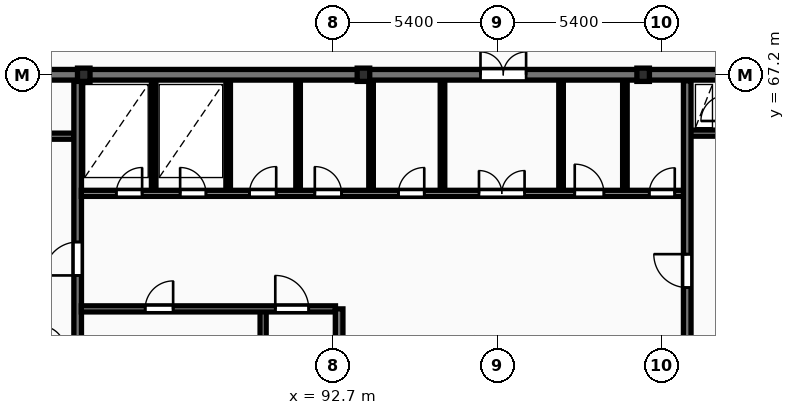
"""IFC4 building model, lengths in metres.
Left out: names, types, materials, properties, quantities, classifications, styles, units other than length and angle.
Written with IfcOpenShell. Run it as: python <this file> out.ifc"""

import sys

from ifc_helpers import new_model, si_unit, direction, frame, frame_2d, origin, origin_2d, place, context, subcontext, project, spatial, rectangle, i_section, extrude, element, fill, save


model = new_model("IFC4")
c1 = context("Model", 3, precision=1e-05, world=origin(), true_north=direction((0.0, 1.0)))
c2 = subcontext(c1, "Body", "Model", "MODEL_VIEW")
j1 = project(units=[si_unit("LENGTHUNIT", "METRE"), si_unit("PLANEANGLEUNIT", "RADIAN")], contexts=[c1])
p1 = place(None, origin())
s1 = spatial("IfcSite", under=j1, at=p1, CompositionType="ELEMENT")
p2 = place(p1, origin())
s2 = spatial("IfcBuilding", under=s1, at=p2, CompositionType="ELEMENT")
p3 = place(p2, frame((0.0, 0.0, 139.3)))
s3 = spatial("IfcBuildingStorey", under=s2, at=p3, CompositionType="ELEMENT", Elevation=139.3)
for number, where, z_axis, x_axis in (
    (1, (84.5, 67.2, 0.0), (0.0, 0.0, 1.0), (1.0, 0.0, 0.0)),
    (2, (93.7, 67.2, 0.0), (0.0, 0.0, 1.0), (1.0, 0.0, 0.0)),
    (3, (102.9, 67.2, 0.0), (0.0, 0.0, 1.0), (1.0, 0.0, 0.0)),
):
    element("IfcColumn", number, at=place(p3, frame(where, z_axis=z_axis, x_axis=x_axis)), inside=s3, PredefinedType="COLUMN", context=c2, shape_type="SweptSolid", body=[
        extrude(i_section(OverallWidth=0.412, OverallDepth=0.437, WebThickness=0.036, FlangeThickness=0.052, FilletRadius=0.015, at=origin_2d()), origin(), (0.0, 0.0, 1.0), 3.6),
    ])
p4 = place(p3, frame((75.95, 67.2, 0.0), z_axis=(0.0, 0.0, 1.0), x_axis=(1.0, 0.0, 0.0)))
e4 = element("IfcWall", 4, at=p4, inside=s3, PredefinedType="SHEAR", context=c2, shape_type="SweptSolid", body=[
    extrude(rectangle(XDim=36.3, YDim=0.35, at=frame_2d((18.15, 0.0))), origin(), (0.0, 0.0, 1.0), 3.6),
])
p5 = place(p4, frame((5.25, 0.0, 0.0)))
e5 = element("IfcOpeningElement", 5, at=p5, cuts=e4, PredefinedType="OPENING", context=c2, shape_type="SweptSolid", body=[
    extrude(rectangle(XDim=1.0, YDim=2.15, at=frame_2d((0.5, 1.075))), frame((0.0, 0.185, 0.0), z_axis=(0.0, -1.0, 0.0), x_axis=(1.0, 0.0, 0.0)), (0.0, 0.0, 1.0), 0.37),
])
p6 = place(p4, frame((21.6, 0.0, 0.0)))
e6 = element("IfcOpeningElement", 6, at=p6, cuts=e4, PredefinedType="OPENING", context=c2, shape_type="SweptSolid", body=[
    extrude(rectangle(XDim=1.5, YDim=2.2, at=frame_2d((0.75, 1.1))), frame((0.0, 0.185, 0.0), z_axis=(0.0, -1.0, 0.0), x_axis=(1.0, 0.0, 0.0)), (0.0, 0.0, 1.0), 0.37),
])
p7 = place(p4, frame((30.45, 0.0, 0.0)))
e7 = element("IfcOpeningElement", 7, at=p7, cuts=e4, PredefinedType="OPENING", context=c2, shape_type="SweptSolid", body=[
    extrude(rectangle(XDim=1.0, YDim=2.15, at=frame_2d((0.5, 1.075))), frame((0.0, 0.185, 0.0), z_axis=(0.0, -1.0, 0.0), x_axis=(1.0, 0.0, 0.0)), (0.0, 0.0, 1.0), 0.37),
])
p8 = place(p3, frame((79.79, 65.18, 0.0), z_axis=(0.0, 0.0, 1.0), x_axis=(1.0, 0.0, 0.0)))
e8 = element("IfcWall", 8, at=p8, inside=s3, PredefinedType="PARTITIONING", context=c2, shape_type="SweptSolid", body=[
    extrude(rectangle(XDim=4.39, YDim=0.2, at=frame_2d((2.195, 0.0))), origin(), (0.0, 0.0, 1.0), 3.31),
])
p9 = place(p8, frame((1.5, 0.0, 0.0)))
e9 = element("IfcOpeningElement", 9, at=p9, cuts=e8, PredefinedType="OPENING", context=c2, shape_type="SweptSolid", body=[
    extrude(rectangle(XDim=1.1, YDim=2.1, at=frame_2d((0.55, 1.05))), frame((0.0, 0.11, 0.0), z_axis=(0.0, -1.0, 0.0), x_axis=(1.0, 0.0, 0.0)), (0.0, 0.0, 1.0), 0.22),
])
p10 = place(p3, frame((84.3, 55.4, 0.0), z_axis=(0.0, 0.0, 1.0), x_axis=(0.0, 1.0, 0.0)))
e10 = element("IfcWall", 10, at=p10, inside=s3, PredefinedType="SHEAR", context=c2, shape_type="SweptSolid", body=[
    extrude(rectangle(XDim=11.6, YDim=0.25, at=frame_2d((5.8, 0.0))), origin(), (0.0, 0.0, 1.0), 3.6),
])
p11 = place(p10, frame((5.2, 0.0, 0.0)))
e11 = element("IfcOpeningElement", 11, at=p11, cuts=e10, PredefinedType="OPENING", context=c2, shape_type="SweptSolid", body=[
    extrude(rectangle(XDim=1.1, YDim=2.1, at=frame_2d((0.55, 1.05))), frame((0.0, 0.135, 0.0), z_axis=(0.0, -1.0, 0.0), x_axis=(1.0, 0.0, 0.0)), (0.0, 0.0, 1.0), 0.27),
])
p12 = place(p3, frame((90.4, 55.4, 0.0), z_axis=(0.0, 0.0, 1.0), x_axis=(0.0, 1.0, 0.0)))
e12 = element("IfcWall", 12, at=p12, inside=s3, PredefinedType="PARTITIONING", context=c2, shape_type="SweptSolid", body=[
    extrude(rectangle(XDim=4.1, YDim=0.2, at=frame_2d((2.05, 0.0))), origin(), (0.0, 0.0, 1.0), 3.31),
])
p13 = place(p3, frame((84.42, 59.5, 0.0), z_axis=(0.0, 0.0, 1.0), x_axis=(1.0, 0.0, 0.0)))
e13 = element("IfcWall", 13, at=p13, inside=s3, PredefinedType="PARTITIONING", context=c2, shape_type="SweptSolid", body=[
    extrude(rectangle(XDim=8.36, YDim=0.2, at=frame_2d((4.18, 0.0))), origin(), (0.0, 0.0, 1.0), 3.31),
])
p14 = place(p13, frame((2.1, 0.0, 0.0)))
e14 = element("IfcOpeningElement", 14, at=p14, cuts=e13, PredefinedType="OPENING", context=c2, shape_type="SweptSolid", body=[
    extrude(rectangle(XDim=0.92, YDim=2.08, at=frame_2d((0.46, 1.04))), frame((0.0, 0.11, 0.0), z_axis=(0.0, -1.0, 0.0), x_axis=(1.0, 0.0, 0.0)), (0.0, 0.0, 1.0), 0.22),
])
p15 = place(p13, frame((6.38, 0.0, 0.0)))
e15 = element("IfcOpeningElement", 15, at=p15, cuts=e13, PredefinedType="OPENING", context=c2, shape_type="SweptSolid", body=[
    extrude(rectangle(XDim=1.1, YDim=2.1, at=frame_2d((0.55, 1.05))), frame((0.0, 0.11, 0.0), z_axis=(0.0, -1.0, 0.0), x_axis=(1.0, 0.0, 0.0)), (0.0, 0.0, 1.0), 0.22),
])
p16 = place(p3, frame((92.9, 55.4, 0.0), z_axis=(0.0, 0.0, 1.0), x_axis=(0.0, 1.0, 0.0)))
e16 = element("IfcWall", 16, at=p16, inside=s3, PredefinedType="SHEAR", context=c2, shape_type="SweptSolid", body=[
    extrude(rectangle(XDim=4.1, YDim=0.25, at=frame_2d((2.05, 0.0))), origin(), (0.0, 0.0, 1.0), 3.6),
])
for number, where, z_axis, x_axis in (
    (17, (86.8, 63.4, 0.0), (0.0, 0.0, 1.0), (0.0, 1.0, 0.0)),
    (18, (89.25, 63.4, 0.0), (0.0, 0.0, 1.0), (0.0, 1.0, 0.0)),
    (19, (91.55, 63.4, 0.0), (0.0, 0.0, 1.0), (0.0, 1.0, 0.0)),
):
    element("IfcWall", number, at=place(p3, frame(where, z_axis=z_axis, x_axis=x_axis)), inside=s3, PredefinedType="PARTITIONING", context=c2, shape_type="SweptSolid", body=[
        extrude(rectangle(XDim=3.6, YDim=0.15, at=frame_2d((1.8, 0.0))), origin(), (0.0, 0.0, 1.0), 3.31),
    ])
p17 = place(p3, frame((93.95, 63.4, 0.0), z_axis=(0.0, 0.0, 1.0), x_axis=(0.0, 1.0, 0.0)))
e20 = element("IfcWall", 20, at=p17, inside=s3, PredefinedType="PARTITIONING", context=c2, shape_type="SweptSolid", body=[
    extrude(rectangle(XDim=3.6, YDim=0.15, at=frame_2d((1.8, 0.0))), origin(), (0.0, 0.0, 1.0), 2.617),
])
for number, where, z_axis, x_axis in (
    (21, (102.3, 63.4, 0.0), (0.0, 0.0, 1.0), (0.0, 1.0, 0.0)),
    (22, (96.3, 63.4, 0.0), (0.0, 0.0, 1.0), (0.0, 1.0, 0.0)),
    (23, (100.2, 63.4, 0.0), (0.0, 0.0, 1.0), (0.0, 1.0, 0.0)),
):
    element("IfcWall", number, at=place(p3, frame(where, z_axis=z_axis, x_axis=x_axis)), inside=s3, PredefinedType="PARTITIONING", context=c2, shape_type="SweptSolid", body=[
        extrude(rectangle(XDim=3.6, YDim=0.15, at=frame_2d((1.8, 0.0))), origin(), (0.0, 0.0, 1.0), 3.31),
    ])
p18 = place(p3, frame((84.42, 63.3, 0.0), z_axis=(0.0, 0.0, 1.0), x_axis=(1.0, 0.0, 0.0)))
e24 = element("IfcWall", 24, at=p18, inside=s3, PredefinedType="PARTITIONING", context=c2, shape_type="SweptSolid", body=[
    extrude(rectangle(XDim=19.83, YDim=0.2, at=frame_2d((9.915, 0.0))), origin(), (0.0, 0.0, 1.0), 3.31),
])
p19 = place(p18, frame((1.15, 0.0, 0.0)))
e25 = element("IfcOpeningElement", 25, at=p19, cuts=e24, PredefinedType="OPENING", context=c2, shape_type="SweptSolid", body=[
    extrude(rectangle(XDim=0.85, YDim=2.05, at=frame_2d((0.425, 1.025))), frame((0.0, 0.11, 0.0), z_axis=(0.0, -1.0, 0.0), x_axis=(1.0, 0.0, 0.0)), (0.0, 0.0, 1.0), 0.22),
])
p20 = place(p18, frame((3.25, 0.0, 0.0)))
e26 = element("IfcOpeningElement", 26, at=p20, cuts=e24, PredefinedType="OPENING", context=c2, shape_type="SweptSolid", body=[
    extrude(rectangle(XDim=0.85, YDim=2.05, at=frame_2d((0.425, 1.025))), frame((0.0, 0.11, 0.0), z_axis=(0.0, -1.0, 0.0), x_axis=(1.0, 0.0, 0.0)), (0.0, 0.0, 1.0), 0.22),
])
p21 = place(p18, frame((13.08, 0.0, 0.0)))
e27 = element("IfcOpeningElement", 27, at=p21, cuts=e24, PredefinedType="OPENING", context=c2, shape_type="SweptSolid", body=[
    extrude(rectangle(XDim=1.5, YDim=2.2, at=frame_2d((0.75, 1.1))), frame((0.0, 0.11, 0.0), z_axis=(0.0, -1.0, 0.0), x_axis=(1.0, 0.0, 0.0)), (0.0, 0.0, 1.0), 0.22),
])
p22 = place(p18, frame((5.53, 0.0, 0.0)))
e28 = element("IfcOpeningElement", 28, at=p22, cuts=e24, PredefinedType="OPENING", context=c2, shape_type="SweptSolid", body=[
    extrude(rectangle(XDim=0.88, YDim=2.06, at=frame_2d((0.44, 1.03))), frame((0.0, 0.11, 0.0), z_axis=(0.0, -1.0, 0.0), x_axis=(1.0, 0.0, 0.0)), (0.0, 0.0, 1.0), 0.22),
])
p23 = place(p18, frame((7.68, 0.0, 0.0)))
e29 = element("IfcOpeningElement", 29, at=p23, cuts=e24, PredefinedType="OPENING", context=c2, shape_type="SweptSolid", body=[
    extrude(rectangle(XDim=0.88, YDim=2.06, at=frame_2d((0.44, 1.03))), frame((0.0, 0.11, 0.0), z_axis=(0.0, -1.0, 0.0), x_axis=(1.0, 0.0, 0.0)), (0.0, 0.0, 1.0), 0.22),
])
p24 = place(p18, frame((10.43, 0.0, 0.0)))
e30 = element("IfcOpeningElement", 30, at=p24, cuts=e24, PredefinedType="OPENING", context=c2, shape_type="SweptSolid", body=[
    extrude(rectangle(XDim=0.85, YDim=2.05, at=frame_2d((0.425, 1.025))), frame((0.0, 0.11, 0.0), z_axis=(0.0, -1.0, 0.0), x_axis=(1.0, 0.0, 0.0)), (0.0, 0.0, 1.0), 0.22),
])
p25 = place(p18, frame((16.23, 0.0, 0.0)))
e31 = element("IfcOpeningElement", 31, at=p25, cuts=e24, PredefinedType="OPENING", context=c2, shape_type="SweptSolid", body=[
    extrude(rectangle(XDim=0.96, YDim=2.1, at=frame_2d((0.48, 1.05))), frame((0.0, 0.11, 0.0), z_axis=(0.0, -1.0, 0.0), x_axis=(1.0, 0.0, 0.0)), (0.0, 0.0, 1.0), 0.22),
])
p26 = place(p18, frame((18.68, 0.0, 0.0)))
e32 = element("IfcOpeningElement", 32, at=p26, cuts=e24, PredefinedType="OPENING", context=c2, shape_type="SweptSolid", body=[
    extrude(rectangle(XDim=0.84, YDim=2.04, at=frame_2d((0.42, 1.02))), frame((0.0, 0.11, 0.0), z_axis=(0.0, -1.0, 0.0), x_axis=(1.0, 0.0, 0.0)), (0.0, 0.0, 1.0), 0.22),
])
p27 = place(p3, frame((104.45, 65.28, 0.0), z_axis=(0.0, 0.0, 1.0), x_axis=(1.0, 0.0, 0.0)))
e33 = element("IfcWall", 33, at=p27, inside=s3, PredefinedType="PARTITIONING", context=c2, shape_type="SweptSolid", body=[
    extrude(rectangle(XDim=1.2, YDim=0.2, at=frame_2d((0.6, 0.0))), origin(), (0.0, 0.0, 1.0), 3.31),
])
p28 = place(p3, frame((104.35, 58.4, 0.0), z_axis=(0.0, 0.0, 1.0), x_axis=(0.0, 1.0, 0.0)))
e34 = element("IfcWall", 34, at=p28, inside=s3, PredefinedType="SHEAR", context=c2, shape_type="SweptSolid", body=[
    extrude(rectangle(XDim=8.6, YDim=0.25, at=frame_2d((4.3, 0.0))), origin(), (0.0, 0.0, 1.0), 3.6),
])
p29 = place(p28, frame((1.8, 0.0, 0.0)))
e35 = element("IfcOpeningElement", 35, at=p29, cuts=e34, PredefinedType="OPENING", context=c2, shape_type="SweptSolid", body=[
    extrude(rectangle(XDim=1.1, YDim=2.1, at=frame_2d((0.55, 1.05))), frame((0.0, 0.135, 0.0), z_axis=(0.0, -1.0, 0.0), x_axis=(1.0, 0.0, 0.0)), (0.0, 0.0, 1.0), 0.27),
])
p30 = place(p6, origin())
e36 = element("IfcDoor", 36, at=p30, inside=s3, OperationType="DOUBLE_DOOR_SINGLE_SWING", PredefinedType="DOOR", context=c2, shape_type="SweptSolid", body=[
    extrude(rectangle(XDim=1.5, YDim=2.2, at=frame_2d((0.75, 1.1))), frame((0.0, 0.025, 0.0), z_axis=(0.0, -1.0, 0.0), x_axis=(1.0, 0.0, 0.0)), (0.0, 0.0, 1.0), 0.05),
])
fill(e6, e36)
p31 = place(p11, origin())
e37 = element("IfcDoor", 37, at=p31, inside=s3, OperationType="SINGLE_SWING_LEFT", PredefinedType="DOOR", context=c2, shape_type="SweptSolid", body=[
    extrude(rectangle(XDim=1.1, YDim=2.1, at=frame_2d((0.55, 1.05))), frame((0.0, 0.025, 0.0), z_axis=(0.0, -1.0, 0.0), x_axis=(1.0, 0.0, 0.0)), (0.0, 0.0, 1.0), 0.05),
])
fill(e11, e37)
p32 = place(p14, origin())
e38 = element("IfcDoor", 38, at=p32, inside=s3, OperationType="SINGLE_SWING_RIGHT", PredefinedType="DOOR", context=c2, shape_type="SweptSolid", body=[
    extrude(rectangle(XDim=0.92, YDim=2.08, at=frame_2d((0.46, 1.04))), frame((0.0, 0.025, 0.0), z_axis=(0.0, -1.0, 0.0), x_axis=(1.0, 0.0, 0.0)), (0.0, 0.0, 1.0), 0.05),
])
fill(e14, e38)
p33 = place(p15, origin())
e39 = element("IfcDoor", 39, at=p33, inside=s3, OperationType="SINGLE_SWING_LEFT", PredefinedType="DOOR", context=c2, shape_type="SweptSolid", body=[
    extrude(rectangle(XDim=1.1, YDim=2.1, at=frame_2d((0.55, 1.05))), frame((0.0, 0.025, 0.0), z_axis=(0.0, -1.0, 0.0), x_axis=(1.0, 0.0, 0.0)), (0.0, 0.0, 1.0), 0.05),
])
fill(e15, e39)
p34 = place(p19, origin())
e40 = element("IfcDoor", 40, at=p34, inside=s3, OperationType="SINGLE_SWING_RIGHT", PredefinedType="DOOR", context=c2, shape_type="SweptSolid", body=[
    extrude(rectangle(XDim=0.85, YDim=2.05, at=frame_2d((0.425, 1.025))), frame((0.0, 0.025, 0.0), z_axis=(0.0, -1.0, 0.0), x_axis=(1.0, 0.0, 0.0)), (0.0, 0.0, 1.0), 0.05),
])
fill(e25, e40)
p35 = place(p20, origin())
e41 = element("IfcDoor", 41, at=p35, inside=s3, OperationType="SINGLE_SWING_LEFT", PredefinedType="DOOR", context=c2, shape_type="SweptSolid", body=[
    extrude(rectangle(XDim=0.85, YDim=2.05, at=frame_2d((0.425, 1.025))), frame((0.0, 0.025, 0.0), z_axis=(0.0, -1.0, 0.0), x_axis=(1.0, 0.0, 0.0)), (0.0, 0.0, 1.0), 0.05),
])
fill(e26, e41)
p36 = place(p21, origin())
e42 = element("IfcDoor", 42, at=p36, inside=s3, OperationType="DOUBLE_DOOR_SINGLE_SWING", PredefinedType="DOOR", context=c2, shape_type="SweptSolid", body=[
    extrude(rectangle(XDim=1.5, YDim=2.2, at=frame_2d((0.75, 1.1))), frame((0.0, 0.025, 0.0), z_axis=(0.0, -1.0, 0.0), x_axis=(1.0, 0.0, 0.0)), (0.0, 0.0, 1.0), 0.05),
])
fill(e27, e42)
p37 = place(p22, origin())
e43 = element("IfcDoor", 43, at=p37, inside=s3, OperationType="SINGLE_SWING_RIGHT", PredefinedType="DOOR", context=c2, shape_type="SweptSolid", body=[
    extrude(rectangle(XDim=0.88, YDim=2.06, at=frame_2d((0.44, 1.03))), frame((0.0, 0.025, 0.0), z_axis=(0.0, -1.0, 0.0), x_axis=(1.0, 0.0, 0.0)), (0.0, 0.0, 1.0), 0.05),
])
fill(e28, e43)
p38 = place(p23, origin())
e44 = element("IfcDoor", 44, at=p38, inside=s3, OperationType="SINGLE_SWING_LEFT", PredefinedType="DOOR", context=c2, shape_type="SweptSolid", body=[
    extrude(rectangle(XDim=0.88, YDim=2.06, at=frame_2d((0.44, 1.03))), frame((0.0, 0.025, 0.0), z_axis=(0.0, -1.0, 0.0), x_axis=(1.0, 0.0, 0.0)), (0.0, 0.0, 1.0), 0.05),
])
fill(e29, e44)
p39 = place(p24, origin())
e45 = element("IfcDoor", 45, at=p39, inside=s3, OperationType="SINGLE_SWING_RIGHT", PredefinedType="DOOR", context=c2, shape_type="SweptSolid", body=[
    extrude(rectangle(XDim=0.85, YDim=2.05, at=frame_2d((0.425, 1.025))), frame((0.0, 0.025, 0.0), z_axis=(0.0, -1.0, 0.0), x_axis=(1.0, 0.0, 0.0)), (0.0, 0.0, 1.0), 0.05),
])
fill(e30, e45)
p40 = place(p25, origin())
e46 = element("IfcDoor", 46, at=p40, inside=s3, OperationType="SINGLE_SWING_LEFT", PredefinedType="DOOR", context=c2, shape_type="SweptSolid", body=[
    extrude(rectangle(XDim=0.96, YDim=2.1, at=frame_2d((0.48, 1.05))), frame((0.0, 0.025, 0.0), z_axis=(0.0, -1.0, 0.0), x_axis=(1.0, 0.0, 0.0)), (0.0, 0.0, 1.0), 0.05),
])
fill(e31, e46)
p41 = place(p26, origin())
e47 = element("IfcDoor", 47, at=p41, inside=s3, OperationType="SINGLE_SWING_RIGHT", PredefinedType="DOOR", context=c2, shape_type="SweptSolid", body=[
    extrude(rectangle(XDim=0.84, YDim=2.04, at=frame_2d((0.42, 1.02))), frame((0.0, 0.025, 0.0), z_axis=(0.0, -1.0, 0.0), x_axis=(1.0, 0.0, 0.0)), (0.0, 0.0, 1.0), 0.05),
])
fill(e32, e47)
p42 = place(p29, origin())
e48 = element("IfcDoor", 48, at=p42, inside=s3, OperationType="SINGLE_SWING_RIGHT", PredefinedType="DOOR", context=c2, shape_type="SweptSolid", body=[
    extrude(rectangle(XDim=1.1, YDim=2.1, at=frame_2d((0.55, 1.05))), frame((0.0, 0.025, 0.0), z_axis=(0.0, -1.0, 0.0), x_axis=(1.0, 0.0, 0.0)), (0.0, 0.0, 1.0), 0.05),
])
fill(e35, e48)
save(model, sys.argv[1])
